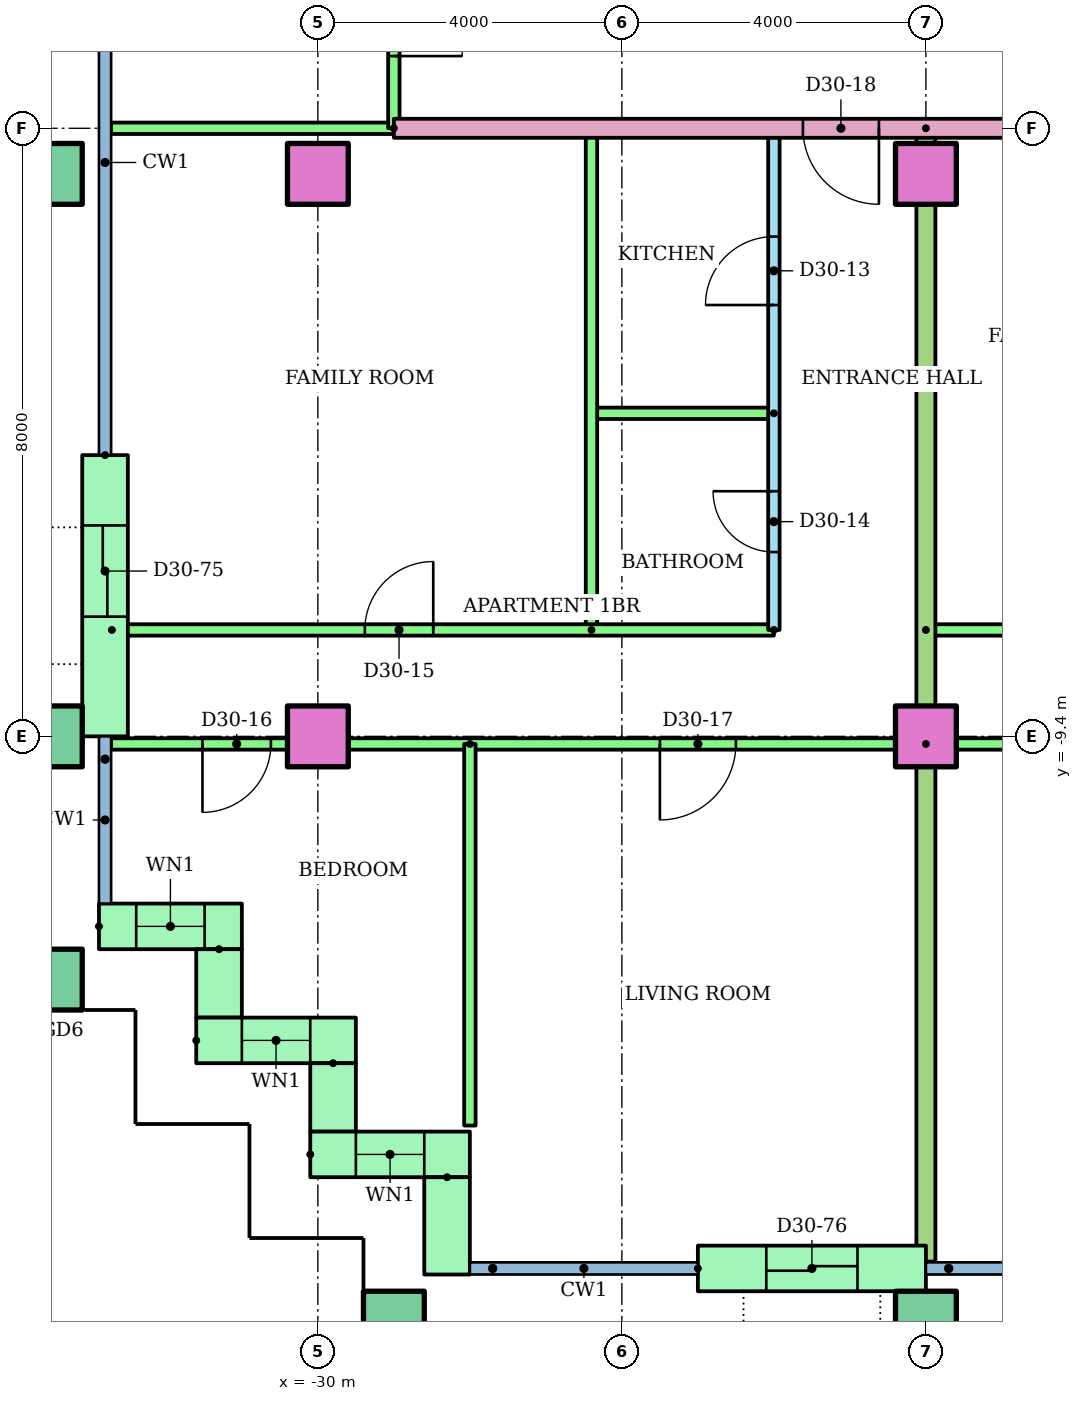
"""IFC4 building model, lengths in metres.
Left out: names, types, materials, properties, quantities, classifications, styles, units other than length and angle.
Written with IfcOpenShell. Run it as: python <this file> out.ifc"""

import sys

from ifc_helpers import new_model, si_unit, direction, frame, frame_2d, origin, origin_2d, place, context, subcontext, project, spatial, rectangle, hollow_rectangle, extrude, element, fill, save


model = new_model("IFC4")
c1 = context("Model", 3, precision=1e-05, world=origin(), true_north=direction((0.0, 1.0)))
c2 = subcontext(c1, "Body", "Model", "MODEL_VIEW")
j1 = project(units=[si_unit("LENGTHUNIT", "METRE"), si_unit("PLANEANGLEUNIT", "RADIAN")], contexts=[c1])
p1 = place(None, origin())
s1 = spatial("IfcSite", under=j1, at=p1, CompositionType="ELEMENT")
p2 = place(p1, origin())
s2 = spatial("IfcBuilding", under=s1, at=p2, CompositionType="ELEMENT")
p3 = place(p2, frame((0.0, 0.0, 119.8)))
s3 = spatial("IfcBuildingStorey", under=s2, at=p3, CompositionType="ELEMENT", Elevation=119.8)
for number, where in (
    (1, (-29.0, -17.1, 0.0)),
    (2, (-22.0, -17.1, 0.0)),
    (3, (-33.5, -12.6, 0.0)),
    (4, (-33.5, -9.4, 0.0)),
):
    element("IfcColumn", number, at=place(p3, frame(where)), inside=s3, PredefinedType="COLUMN", context=c2, shape_type="SweptSolid", body=[
        extrude(hollow_rectangle(XDim=0.8, YDim=0.8, WallThickness=0.04, at=origin_2d()), origin(), (0.0, 0.0, 1.0), 3.2),
    ])
for number, where in (
    (5, (-30.0, -9.4, 0.0)),
    (6, (-22.0, -9.4, 0.0)),
):
    element("IfcColumn", number, at=place(p3, frame(where)), inside=s3, PredefinedType="COLUMN", context=c2, shape_type="SweptSolid", body=[
        extrude(rectangle(XDim=0.8, YDim=0.8, at=origin_2d()), origin(), (0.0, 0.0, 1.0), 3.2),
    ])
p4 = place(p3, frame((-33.5, -2.0, 0.0)))
e7 = element("IfcColumn", 7, at=p4, inside=s3, PredefinedType="COLUMN", context=c2, shape_type="SweptSolid", body=[
    extrude(hollow_rectangle(XDim=0.8, YDim=0.8, WallThickness=0.04, at=origin_2d()), origin(), (0.0, 0.0, 1.0), 3.2),
])
for number, where in (
    (8, (-30.0, -2.0, 0.0)),
    (9, (-22.0, -2.0, 0.0)),
):
    element("IfcColumn", number, at=place(p3, frame(where)), inside=s3, PredefinedType="COLUMN", context=c2, shape_type="SweptSolid", body=[
        extrude(rectangle(XDim=0.8, YDim=0.8, at=origin_2d()), origin(), (0.0, 0.0, 1.0), 3.2),
    ])
p5 = place(p3, frame((-32.8, -5.7, 0.0), z_axis=(0.0, 0.0, 1.0), x_axis=(0.0, -1.0, 0.0)))
e10 = element("IfcWall", 10, at=p5, inside=s3, PredefinedType="STANDARD", context=c2, shape_type="SweptSolid", body=[
    extrude(rectangle(XDim=3.7, YDim=0.6, at=frame_2d((1.85, 0.0))), origin(), (0.0, 0.0, 1.0), 2.92),
])
p6 = place(p5, frame((0.925, 0.0, 0.0)))
e11 = element("IfcOpeningElement", 11, at=p6, cuts=e10, PredefinedType="OPENING", context=c2, shape_type="SweptSolid", body=[
    extrude(rectangle(XDim=1.2, YDim=2.1, at=frame_2d((0.6, 1.05))), frame((0.0, 0.31, 0.0), z_axis=(0.0, -1.0, 0.0), x_axis=(1.0, 0.0, 0.0)), (0.0, 0.0, 1.0), 0.62),
])
p7 = place(p3, frame((-32.88, -11.9, 0.0)))
e12 = element("IfcWall", 12, at=p7, inside=s3, PredefinedType="STANDARD", context=c2, shape_type="SweptSolid", body=[
    extrude(rectangle(XDim=1.88, YDim=0.6, at=frame_2d((0.94, 0.0))), origin(), (0.0, 0.0, 1.0), 2.92),
])
p8 = place(p7, frame((0.49, 0.0, 0.9)))
e13 = element("IfcOpeningElement", 13, at=p8, cuts=e12, PredefinedType="OPENING", context=c2, shape_type="SweptSolid", body=[
    extrude(rectangle(XDim=0.9, YDim=1.5, at=frame_2d((0.45, 0.75))), frame((0.0, 0.31, 0.0), z_axis=(0.0, -1.0, 0.0), x_axis=(1.0, 0.0, 0.0)), (0.0, 0.0, 1.0), 0.62),
])
p9 = place(p3, frame((-31.3, -12.2, 0.0), z_axis=(0.0, 0.0, 1.0), x_axis=(0.0, -1.0, 0.0)))
e14 = element("IfcWall", 14, at=p9, inside=s3, PredefinedType="STANDARD", context=c2, shape_type="SweptSolid", body=[
    extrude(rectangle(XDim=0.9, YDim=0.6, at=frame_2d((0.45, 0.0))), origin(), (0.0, 0.0, 1.0), 2.92),
])
p10 = place(p3, frame((-31.6, -13.4, 0.0)))
e15 = element("IfcWall", 15, at=p10, inside=s3, PredefinedType="STANDARD", context=c2, shape_type="SweptSolid", body=[
    extrude(rectangle(XDim=2.1, YDim=0.6, at=frame_2d((1.05, 0.0))), origin(), (0.0, 0.0, 1.0), 2.92),
])
p11 = place(p10, frame((0.6, 0.0, 0.9)))
e16 = element("IfcOpeningElement", 16, at=p11, cuts=e15, PredefinedType="OPENING", context=c2, shape_type="SweptSolid", body=[
    extrude(rectangle(XDim=0.9, YDim=1.5, at=frame_2d((0.45, 0.75))), frame((0.0, 0.31, 0.0), z_axis=(0.0, -1.0, 0.0), x_axis=(1.0, 0.0, 0.0)), (0.0, 0.0, 1.0), 0.62),
])
p12 = place(p3, frame((-29.8, -13.7, 0.0), z_axis=(0.0, 0.0, 1.0), x_axis=(0.0, -1.0, 0.0)))
e17 = element("IfcWall", 17, at=p12, inside=s3, PredefinedType="STANDARD", context=c2, shape_type="SweptSolid", body=[
    extrude(rectangle(XDim=0.9, YDim=0.6, at=frame_2d((0.45, 0.0))), origin(), (0.0, 0.0, 1.0), 2.92),
])
p13 = place(p3, frame((-30.1, -14.9, 0.0)))
e18 = element("IfcWall", 18, at=p13, inside=s3, PredefinedType="STANDARD", context=c2, shape_type="SweptSolid", body=[
    extrude(rectangle(XDim=2.1, YDim=0.6, at=frame_2d((1.05, 0.0))), origin(), (0.0, 0.0, 1.0), 2.92),
])
p14 = place(p13, frame((0.6, 0.0, 0.9)))
e19 = element("IfcOpeningElement", 19, at=p14, cuts=e18, PredefinedType="OPENING", context=c2, shape_type="SweptSolid", body=[
    extrude(rectangle(XDim=0.9, YDim=1.5, at=frame_2d((0.45, 0.75))), frame((0.0, 0.31, 0.0), z_axis=(0.0, -1.0, 0.0), x_axis=(1.0, 0.0, 0.0)), (0.0, 0.0, 1.0), 0.62),
])
p15 = place(p3, frame((-28.3, -15.2, 0.0), z_axis=(0.0, 0.0, 1.0), x_axis=(0.0, -1.0, 0.0)))
e20 = element("IfcWall", 20, at=p15, inside=s3, PredefinedType="STANDARD", context=c2, shape_type="SweptSolid", body=[
    extrude(rectangle(XDim=1.28, YDim=0.6, at=frame_2d((0.64, 0.0))), origin(), (0.0, 0.0, 1.0), 2.92),
])
p16 = place(p3, frame((-25.0, -16.4, 0.0)))
e21 = element("IfcWall", 21, at=p16, inside=s3, PredefinedType="STANDARD", context=c2, shape_type="SweptSolid", body=[
    extrude(rectangle(XDim=3.0, YDim=0.6, at=frame_2d((1.5, 0.0))), origin(), (0.0, 0.0, 1.0), 2.92),
])
p17 = place(p16, frame((0.9, 0.0, 0.0)))
e22 = element("IfcOpeningElement", 22, at=p17, cuts=e21, PredefinedType="OPENING", context=c2, shape_type="SweptSolid", body=[
    extrude(rectangle(XDim=1.2, YDim=2.1, at=frame_2d((0.6, 1.05))), frame((0.0, 0.31, 0.0), z_axis=(0.0, -1.0, 0.0), x_axis=(1.0, 0.0, 0.0)), (0.0, 0.0, 1.0), 0.62),
])
p18 = place(p3, frame((-24.0, -8.0, 0.0), z_axis=(0.0, 0.0, 1.0), x_axis=(0.0, 1.0, 0.0)))
e23 = element("IfcWall", 23, at=p18, inside=s3, PredefinedType="PARTITIONING", context=c2, shape_type="SweptSolid", body=[
    extrude(rectangle(XDim=6.6, YDim=0.15, at=frame_2d((3.3, 0.0))), origin(), (0.0, 0.0, 1.0), 2.4),
])
p19 = place(p18, frame((4.275, 0.0, 0.0)))
e24 = element("IfcOpeningElement", 24, at=p19, cuts=e23, PredefinedType="OPENING", context=c2, shape_type="SweptSolid", body=[
    extrude(rectangle(XDim=0.9, YDim=2.1, at=frame_2d((0.45, 1.05))), frame((0.0, 0.085, 0.0), z_axis=(0.0, -1.0, 0.0), x_axis=(1.0, 0.0, 0.0)), (0.0, 0.0, 1.0), 0.17),
])
p20 = place(p18, frame((1.025, 0.0, 0.0)))
e25 = element("IfcOpeningElement", 25, at=p20, cuts=e23, PredefinedType="OPENING", context=c2, shape_type="SweptSolid", body=[
    extrude(rectangle(XDim=0.8, YDim=2.1, at=frame_2d((0.4, 1.05))), frame((0.0, 0.085, 0.0), z_axis=(0.0, -1.0, 0.0), x_axis=(1.0, 0.0, 0.0)), (0.0, 0.0, 1.0), 0.17),
])
p21 = place(p3, frame((-24.0, -5.15, 0.0), z_axis=(0.0, 0.0, 1.0), x_axis=(-1.0, 0.0, 0.0)))
e26 = element("IfcWall", 26, at=p21, inside=s3, PredefinedType="PARTITIONING", context=c2, shape_type="SweptSolid", body=[
    extrude(rectangle(XDim=2.4, YDim=0.15, at=frame_2d((1.2, 0.0))), origin(), (0.0, 0.0, 1.0), 2.4),
])
p22 = place(p3, frame((-26.4, -8.0, 0.0), z_axis=(0.0, 0.0, 1.0), x_axis=(0.0, 1.0, 0.0)))
e27 = element("IfcWall", 27, at=p22, inside=s3, PredefinedType="PARTITIONING", context=c2, shape_type="SweptSolid", body=[
    extrude(rectangle(XDim=6.6, YDim=0.15, at=frame_2d((3.3, 0.0))), origin(), (0.0, 0.0, 1.0), 2.4),
])
p23 = place(p3, frame((-32.71, -8.0, 0.0)))
e28 = element("IfcWall", 28, at=p23, inside=s3, PredefinedType="PARTITIONING", context=c2, shape_type="SweptSolid", body=[
    extrude(rectangle(XDim=8.71, YDim=0.15, at=frame_2d((4.355, 0.0))), origin(), (0.0, 0.0, 1.0), 2.4),
])
p24 = place(p23, frame((3.328, 0.0, 0.0)))
e29 = element("IfcOpeningElement", 29, at=p24, cuts=e28, PredefinedType="OPENING", context=c2, shape_type="SweptSolid", body=[
    extrude(rectangle(XDim=0.9, YDim=2.1, at=frame_2d((0.45, 1.05))), frame((0.0, 0.085, 0.0), z_axis=(0.0, -1.0, 0.0), x_axis=(1.0, 0.0, 0.0)), (0.0, 0.0, 1.0), 0.17),
])
p25 = place(p3, frame((-22.0, -9.5, 0.0), z_axis=(0.0, 0.0, 1.0), x_axis=(-1.0, 0.0, 0.0)))
e30 = element("IfcWall", 30, at=p25, inside=s3, PredefinedType="PARTITIONING", context=c2, shape_type="SweptSolid", body=[
    extrude(rectangle(XDim=10.72, YDim=0.15, at=frame_2d((5.36, 0.0))), origin(), (0.0, 0.0, 1.0), 2.4),
])
p26 = place(p25, frame((8.618, 0.0, 0.0)))
e31 = element("IfcOpeningElement", 31, at=p26, cuts=e30, PredefinedType="OPENING", context=c2, shape_type="SweptSolid", body=[
    extrude(rectangle(XDim=0.9, YDim=2.1, at=frame_2d((0.45, 1.05))), frame((0.0, 0.085, 0.0), z_axis=(0.0, -1.0, 0.0), x_axis=(1.0, 0.0, 0.0)), (0.0, 0.0, 1.0), 0.17),
])
p27 = place(p25, frame((2.5, 0.0, 0.0)))
e32 = element("IfcOpeningElement", 32, at=p27, cuts=e30, PredefinedType="OPENING", context=c2, shape_type="SweptSolid", body=[
    extrude(rectangle(XDim=1.0, YDim=2.1, at=frame_2d((0.5, 1.05))), frame((0.0, 0.085, 0.0), z_axis=(0.0, -1.0, 0.0), x_axis=(1.0, 0.0, 0.0)), (0.0, 0.0, 1.0), 0.17),
])
p28 = place(p3, frame((-28.0, -9.5, 0.0), z_axis=(0.0, 0.0, 1.0), x_axis=(0.0, -1.0, 0.0)))
e33 = element("IfcWall", 33, at=p28, inside=s3, PredefinedType="PARTITIONING", context=c2, shape_type="SweptSolid", body=[
    extrude(rectangle(XDim=5.02, YDim=0.15, at=frame_2d((2.51, 0.0))), origin(), (0.0, 0.0, 1.0), 2.4),
])
p29 = place(p3, frame((-22.0, -8.0, 0.0)))
e34 = element("IfcWall", 34, at=p29, inside=s3, PredefinedType="PARTITIONING", context=c2, shape_type="SweptSolid", body=[
    extrude(rectangle(XDim=6.0, YDim=0.15, at=frame_2d((3.0, 0.0))), origin(), (0.0, 0.0, 1.0), 2.4),
])
p30 = place(p29, frame((1.35, 0.0, 0.0)))
e35 = element("IfcOpeningElement", 35, at=p30, cuts=e34, PredefinedType="OPENING", context=c2, shape_type="SweptSolid", body=[
    extrude(rectangle(XDim=0.9, YDim=2.1, at=frame_2d((0.45, 1.05))), frame((0.0, 0.085, 0.0), z_axis=(0.0, -1.0, 0.0), x_axis=(1.0, 0.0, 0.0)), (0.0, 0.0, 1.0), 0.17),
])
p31 = place(p3, frame((-14.0, -9.5, 0.0), z_axis=(0.0, 0.0, 1.0), x_axis=(-1.0, 0.0, 0.0)))
e36 = element("IfcWall", 36, at=p31, inside=s3, PredefinedType="PARTITIONING", context=c2, shape_type="SweptSolid", body=[
    extrude(rectangle(XDim=8.0, YDim=0.15, at=frame_2d((4.0, 0.0))), origin(), (0.0, 0.0, 1.0), 2.4),
])
p32 = place(p31, frame((5.5, 0.0, 0.0)))
e37 = element("IfcOpeningElement", 37, at=p32, cuts=e36, PredefinedType="OPENING", context=c2, shape_type="SweptSolid", body=[
    extrude(rectangle(XDim=1.0, YDim=2.1, at=frame_2d((0.5, 1.05))), frame((0.0, 0.085, 0.0), z_axis=(0.0, -1.0, 0.0), x_axis=(1.0, 0.0, 0.0)), (0.0, 0.0, 1.0), 0.17),
])
p33 = place(p31, frame((1.5, 0.0, 0.0)))
e38 = element("IfcOpeningElement", 38, at=p33, cuts=e36, PredefinedType="OPENING", context=c2, shape_type="SweptSolid", body=[
    extrude(rectangle(XDim=1.0, YDim=2.1, at=frame_2d((0.5, 1.05))), frame((0.0, 0.085, 0.0), z_axis=(0.0, -1.0, 0.0), x_axis=(1.0, 0.0, 0.0)), (0.0, 0.0, 1.0), 0.17),
])
p34 = place(p3, frame((-22.0, -1.4, 0.0), z_axis=(0.0, 0.0, 1.0), x_axis=(0.0, -1.0, 0.0)))
e39 = element("IfcWall", 39, at=p34, inside=s3, PredefinedType="PARTITIONING", context=c2, shape_type="SweptSolid", body=[
    extrude(rectangle(XDim=14.91, YDim=0.25, at=frame_2d((7.455, 0.0))), origin(), (0.0, 0.0, 1.0), 2.4),
])
p35 = place(p3, frame((-14.0, -1.4, 0.0), z_axis=(0.0, 0.0, 1.0), x_axis=(-1.0, 0.0, 0.0)))
e40 = element("IfcWall", 40, at=p35, inside=s3, PredefinedType="PARTITIONING", context=c2, shape_type="SweptSolid", body=[
    extrude(rectangle(XDim=15.0, YDim=0.25, at=frame_2d((7.5, 0.0))), origin(), (0.0, 0.0, 1.0), 2.4),
])
p36 = place(p35, frame((8.618, 0.0, 0.0)))
e41 = element("IfcOpeningElement", 41, at=p36, cuts=e40, PredefinedType="OPENING", context=c2, shape_type="SweptSolid", body=[
    extrude(rectangle(XDim=1.0, YDim=2.1, at=frame_2d((0.5, 1.05))), frame((0.0, 0.135, 0.0), z_axis=(0.0, -1.0, 0.0), x_axis=(1.0, 0.0, 0.0)), (0.0, 0.0, 1.0), 0.27),
])
p37 = place(p35, frame((0.618, 0.0, 0.0)))
e42 = element("IfcOpeningElement", 42, at=p37, cuts=e40, PredefinedType="OPENING", context=c2, shape_type="SweptSolid", body=[
    extrude(rectangle(XDim=1.0, YDim=2.1, at=frame_2d((0.5, 1.05))), frame((0.0, 0.135, 0.0), z_axis=(0.0, -1.0, 0.0), x_axis=(1.0, 0.0, 0.0)), (0.0, 0.0, 1.0), 0.27),
])
p38 = place(p3, frame((-29.0, -1.4, 0.0), z_axis=(0.0, 0.0, 1.0), x_axis=(-1.0, 0.0, 0.0)))
e43 = element("IfcWall", 43, at=p38, inside=s3, PredefinedType="PARTITIONING", context=c2, shape_type="SweptSolid", body=[
    extrude(rectangle(XDim=3.72, YDim=0.15, at=frame_2d((1.86, 0.0))), origin(), (0.0, 0.0, 1.0), 2.4),
])
p39 = place(p3, frame((-29.0, 1.4, 0.0), z_axis=(0.0, 0.0, 1.0), x_axis=(0.0, -1.0, 0.0)))
e44 = element("IfcWall", 44, at=p39, inside=s3, PredefinedType="PARTITIONING", context=c2, shape_type="SweptSolid", body=[
    extrude(rectangle(XDim=2.8, YDim=0.15, at=frame_2d((1.4, 0.0))), origin(), (0.0, 0.0, 1.0), 2.4),
])
p40 = place(p39, frame((0.95, 0.0, 0.0)))
e45 = element("IfcOpeningElement", 45, at=p40, cuts=e44, PredefinedType="OPENING", context=c2, shape_type="SweptSolid", body=[
    extrude(rectangle(XDim=0.9, YDim=2.1, at=frame_2d((0.45, 1.05))), frame((0.0, 0.085, 0.0), z_axis=(0.0, -1.0, 0.0), x_axis=(1.0, 0.0, 0.0)), (0.0, 0.0, 1.0), 0.17),
])
p41 = place(p8, origin())
e46 = element("IfcWindow", 46, at=p41, inside=s3, PartitioningType="SINGLE_PANEL", PredefinedType="WINDOW", context=c2, shape_type="SweptSolid", body=[
    extrude(rectangle(XDim=0.9, YDim=1.5, at=frame_2d((0.45, 0.75))), frame((0.0, 0.03, 0.0), z_axis=(0.0, -1.0, 0.0), x_axis=(1.0, 0.0, 0.0)), (0.0, 0.0, 1.0), 0.06),
])
fill(e13, e46)
p42 = place(p11, origin())
e47 = element("IfcWindow", 47, at=p42, inside=s3, PartitioningType="SINGLE_PANEL", PredefinedType="WINDOW", context=c2, shape_type="SweptSolid", body=[
    extrude(rectangle(XDim=0.9, YDim=1.5, at=frame_2d((0.45, 0.75))), frame((0.0, 0.03, 0.0), z_axis=(0.0, -1.0, 0.0), x_axis=(1.0, 0.0, 0.0)), (0.0, 0.0, 1.0), 0.06),
])
fill(e16, e47)
p43 = place(p14, origin())
e48 = element("IfcWindow", 48, at=p43, inside=s3, PartitioningType="SINGLE_PANEL", PredefinedType="WINDOW", context=c2, shape_type="SweptSolid", body=[
    extrude(rectangle(XDim=0.9, YDim=1.5, at=frame_2d((0.45, 0.75))), frame((0.0, 0.03, 0.0), z_axis=(0.0, -1.0, 0.0), x_axis=(1.0, 0.0, 0.0)), (0.0, 0.0, 1.0), 0.06),
])
fill(e19, e48)
p44 = place(p19, origin())
e49 = element("IfcDoor", 49, at=p44, inside=s3, OperationType="SINGLE_SWING_LEFT", PredefinedType="DOOR", context=c2, shape_type="SweptSolid", body=[
    extrude(rectangle(XDim=0.9, YDim=2.1, at=frame_2d((0.45, 1.05))), frame((0.0, 0.025, 0.0), z_axis=(0.0, -1.0, 0.0), x_axis=(1.0, 0.0, 0.0)), (0.0, 0.0, 1.0), 0.05),
])
fill(e24, e49)
p45 = place(p20, origin())
e50 = element("IfcDoor", 50, at=p45, inside=s3, OperationType="SINGLE_SWING_RIGHT", PredefinedType="DOOR", context=c2, shape_type="SweptSolid", body=[
    extrude(rectangle(XDim=0.8, YDim=2.1, at=frame_2d((0.4, 1.05))), frame((0.0, 0.025, 0.0), z_axis=(0.0, -1.0, 0.0), x_axis=(1.0, 0.0, 0.0)), (0.0, 0.0, 1.0), 0.05),
])
fill(e25, e50)
p46 = place(p24, origin())
e51 = element("IfcDoor", 51, at=p46, inside=s3, OperationType="SINGLE_SWING_RIGHT", PredefinedType="DOOR", context=c2, shape_type="SweptSolid", body=[
    extrude(rectangle(XDim=0.9, YDim=2.1, at=frame_2d((0.45, 1.05))), frame((0.0, 0.025, 0.0), z_axis=(0.0, -1.0, 0.0), x_axis=(1.0, 0.0, 0.0)), (0.0, 0.0, 1.0), 0.05),
])
fill(e29, e51)
p47 = place(p26, origin())
e52 = element("IfcDoor", 52, at=p47, inside=s3, OperationType="SINGLE_SWING_RIGHT", PredefinedType="DOOR", context=c2, shape_type="SweptSolid", body=[
    extrude(rectangle(XDim=0.9, YDim=2.1, at=frame_2d((0.45, 1.05))), frame((0.0, 0.025, 0.0), z_axis=(0.0, -1.0, 0.0), x_axis=(1.0, 0.0, 0.0)), (0.0, 0.0, 1.0), 0.05),
])
fill(e31, e52)
p48 = place(p27, origin())
e53 = element("IfcDoor", 53, at=p48, inside=s3, OperationType="SINGLE_SWING_RIGHT", PredefinedType="DOOR", context=c2, shape_type="SweptSolid", body=[
    extrude(rectangle(XDim=1.0, YDim=2.1, at=frame_2d((0.5, 1.05))), frame((0.0, 0.025, 0.0), z_axis=(0.0, -1.0, 0.0), x_axis=(1.0, 0.0, 0.0)), (0.0, 0.0, 1.0), 0.05),
])
fill(e32, e53)
p49 = place(p36, origin())
e54 = element("IfcDoor", 54, at=p49, inside=s3, OperationType="SINGLE_SWING_LEFT", PredefinedType="DOOR", context=c2, shape_type="SweptSolid", body=[
    extrude(rectangle(XDim=1.0, YDim=2.1, at=frame_2d((0.5, 1.05))), frame((0.0, 0.025, 0.0), z_axis=(0.0, -1.0, 0.0), x_axis=(1.0, 0.0, 0.0)), (0.0, 0.0, 1.0), 0.05),
])
fill(e41, e54)
p50 = place(p40, origin())
e55 = element("IfcDoor", 55, at=p50, inside=s3, OperationType="SINGLE_SWING_RIGHT", PredefinedType="DOOR", context=c2, shape_type="SweptSolid", body=[
    extrude(rectangle(XDim=0.9, YDim=2.1, at=frame_2d((0.45, 1.05))), frame((0.0, 0.025, 0.0), z_axis=(0.0, -1.0, 0.0), x_axis=(1.0, 0.0, 0.0)), (0.0, 0.0, 1.0), 0.05),
])
fill(e45, e55)
p51 = place(p6, origin())
e56 = element("IfcDoor", 56, at=p51, inside=s3, OperationType="SLIDING_TO_LEFT", PredefinedType="DOOR", context=c2, shape_type="SweptSolid", body=[
    extrude(rectangle(XDim=1.2, YDim=2.1, at=frame_2d((0.6, 1.05))), frame((0.0, 0.025, 0.0), z_axis=(0.0, -1.0, 0.0), x_axis=(1.0, 0.0, 0.0)), (0.0, 0.0, 1.0), 0.05),
])
fill(e11, e56)
p52 = place(p17, origin())
e57 = element("IfcDoor", 57, at=p52, inside=s3, OperationType="SLIDING_TO_LEFT", PredefinedType="DOOR", context=c2, shape_type="SweptSolid", body=[
    extrude(rectangle(XDim=1.2, YDim=2.1, at=frame_2d((0.6, 1.05))), frame((0.0, 0.025, 0.0), z_axis=(0.0, -1.0, 0.0), x_axis=(1.0, 0.0, 0.0)), (0.0, 0.0, 1.0), 0.05),
])
fill(e22, e57)
save(model, sys.argv[1])
